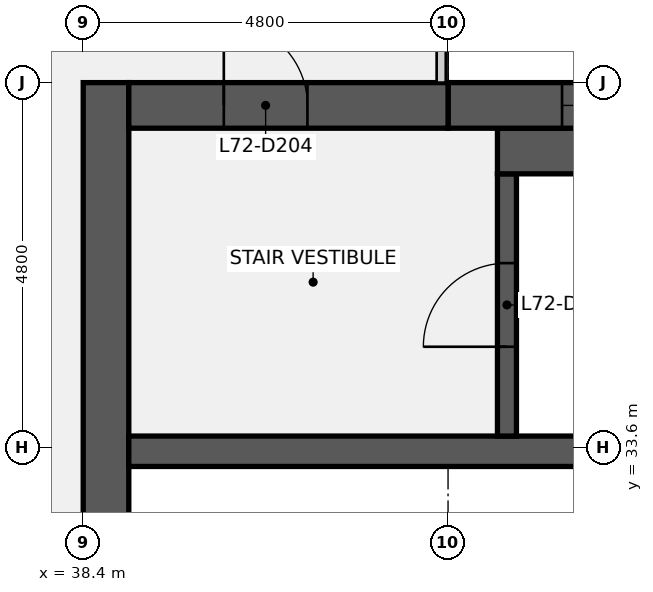
"""IFC4 building model, lengths in metres.
Left out: names, types, materials, properties, quantities, classifications, styles, units other than length and angle.
Written with IfcOpenShell. Run it as: python <this file> out.ifc"""

import sys

from ifc_helpers import new_model, si_unit, direction, frame, frame_2d, origin, place, context, subcontext, project, spatial, rectangle, extrude, element, fill, save


model = new_model("IFC4")
c1 = context("Model", 3, precision=1e-05, world=origin(), true_north=direction((0.0, 1.0)))
c2 = subcontext(c1, "Body", "Model", "MODEL_VIEW")
j1 = project(units=[si_unit("LENGTHUNIT", "METRE"), si_unit("PLANEANGLEUNIT", "RADIAN")], contexts=[c1])
p1 = place(None, origin())
s1 = spatial("IfcSite", under=j1, at=p1, CompositionType="ELEMENT")
p2 = place(p1, origin())
s2 = spatial("IfcBuilding", under=s1, at=p2, CompositionType="ELEMENT")
p3 = place(p2, frame((0.0, 0.0, 326.3)))
s3 = spatial("IfcBuildingStorey", under=s2, at=p3, CompositionType="ELEMENT", Elevation=326.3)
p4 = place(p3, frame((38.7, 9.6, 0.0), z_axis=(0.0, 0.0, 1.0), x_axis=(0.0, 1.0, 0.0)))
e1 = element("IfcWall", 1, at=p4, inside=s3, PredefinedType="SHEAR", context=c2, shape_type="SweptSolid", body=[
    extrude(rectangle(XDim=28.8, YDim=0.6, at=frame_2d((14.4, 0.0))), origin(), (0.0, 0.0, 1.0), 3.84),
])
p5 = place(p4, frame((8.7, 0.0, 0.0)))
e2 = element("IfcOpeningElement", 2, at=p5, cuts=e1, PredefinedType="OPENING", context=c2, shape_type="SweptSolid", body=[
    extrude(rectangle(XDim=1.8, YDim=2.1, at=frame_2d((0.9, 1.05))), frame((0.0, 0.31, 0.0), z_axis=(0.0, -1.0, 0.0), x_axis=(1.0, 0.0, 0.0)), (0.0, 0.0, 1.0), 0.62),
])
p6 = place(p4, frame((18.3, 0.0, 0.0)))
e3 = element("IfcOpeningElement", 3, at=p6, cuts=e1, PredefinedType="OPENING", context=c2, shape_type="SweptSolid", body=[
    extrude(rectangle(XDim=1.8, YDim=2.1, at=frame_2d((0.9, 1.05))), frame((0.0, 0.31, 0.0), z_axis=(0.0, -1.0, 0.0), x_axis=(1.0, 0.0, 0.0)), (0.0, 0.0, 1.0), 0.62),
])
p7 = place(p3, frame((39.0, 33.55, 0.0), z_axis=(0.0, 0.0, 1.0), x_axis=(1.0, 0.0, 0.0)))
e4 = element("IfcWall", 4, at=p7, inside=s3, PredefinedType="SHEAR", context=c2, shape_type="SweptSolid", body=[
    extrude(rectangle(XDim=18.0, YDim=0.4, at=frame_2d((9.0, 0.0))), origin(), (0.0, 0.0, 1.0), 3.84),
])
p8 = place(p3, frame((43.975, 33.75, 0.0), z_axis=(0.0, 0.0, 1.0), x_axis=(0.0, 1.0, 0.0)))
e5 = element("IfcWall", 5, at=p8, inside=s3, PredefinedType="SHEAR", context=c2, shape_type="SweptSolid", body=[
    extrude(rectangle(XDim=3.45, YDim=0.25, at=frame_2d((1.725, 0.0))), origin(), (0.0, 0.0, 1.0), 3.84),
])
p9 = place(p8, frame((1.175, 0.0, 0.0)))
e6 = element("IfcOpeningElement", 6, at=p9, cuts=e5, PredefinedType="OPENING", context=c2, shape_type="SweptSolid", body=[
    extrude(rectangle(XDim=1.1, YDim=2.1, at=frame_2d((0.55, 1.05))), frame((0.0, 0.135, 0.0), z_axis=(0.0, -1.0, 0.0), x_axis=(1.0, 0.0, 0.0)), (0.0, 0.0, 1.0), 0.27),
])
p10 = place(p3, frame((43.85, 37.5, 0.0), z_axis=(0.0, 0.0, 1.0), x_axis=(1.0, 0.0, 0.0)))
e7 = element("IfcWall", 7, at=p10, inside=s3, PredefinedType="SHEAR", context=c2, shape_type="SweptSolid", body=[
    extrude(rectangle(XDim=7.5, YDim=0.6, at=frame_2d((3.75, 0.0))), origin(), (0.0, 0.0, 1.0), 3.84),
])
p11 = place(p3, frame((43.2, 38.1, 0.0), z_axis=(0.0, 0.0, 1.0), x_axis=(1.0, 0.0, 0.0)))
e8 = element("IfcWall", 8, at=p11, inside=s3, PredefinedType="SHEAR", context=c2, shape_type="SweptSolid", body=[
    extrude(rectangle(XDim=13.8, YDim=0.6, at=frame_2d((6.9, 0.0))), origin(), (0.0, 0.0, 1.0), 3.84),
])
p12 = place(p11, frame((6.3, 0.0, 0.9)))
e9 = element("IfcOpeningElement", 9, at=p12, cuts=e8, PredefinedType="OPENING", context=c2, shape_type="SweptSolid", body=[
    extrude(rectangle(XDim=1.8, YDim=1.5, at=frame_2d((0.9, 0.75))), frame((0.0, 0.31, 0.0), z_axis=(0.0, -1.0, 0.0), x_axis=(1.0, 0.0, 0.0)), (0.0, 0.0, 1.0), 0.62),
])
p13 = place(p11, frame((1.5, 0.0, 0.9)))
e10 = element("IfcOpeningElement", 10, at=p13, cuts=e8, PredefinedType="OPENING", context=c2, shape_type="SweptSolid", body=[
    extrude(rectangle(XDim=1.8, YDim=1.5, at=frame_2d((0.9, 0.75))), frame((0.0, 0.31, 0.0), z_axis=(0.0, -1.0, 0.0), x_axis=(1.0, 0.0, 0.0)), (0.0, 0.0, 1.0), 0.62),
])
p14 = place(p3, frame((39.0, 38.1, 0.0), z_axis=(0.0, 0.0, 1.0), x_axis=(1.0, 0.0, 0.0)))
e11 = element("IfcWall", 11, at=p14, inside=s3, PredefinedType="SHEAR", context=c2, shape_type="SweptSolid", body=[
    extrude(rectangle(XDim=4.2, YDim=0.6, at=frame_2d((2.1, 0.0))), origin(), (0.0, 0.0, 1.0), 3.84),
])
p15 = place(p14, frame((1.25, 0.0, 0.0)))
e12 = element("IfcOpeningElement", 12, at=p15, cuts=e11, PredefinedType="OPENING", context=c2, shape_type="SweptSolid", body=[
    extrude(rectangle(XDim=1.1, YDim=2.1, at=frame_2d((0.55, 1.05))), frame((0.0, 0.31, 0.0), z_axis=(0.0, -1.0, 0.0), x_axis=(1.0, 0.0, 0.0)), (0.0, 0.0, 1.0), 0.62),
])
p16 = place(p9, origin())
e13 = element("IfcDoor", 13, at=p16, inside=s3, OperationType="SINGLE_SWING_LEFT", PredefinedType="DOOR", context=c2, shape_type="SweptSolid", body=[
    extrude(rectangle(XDim=1.1, YDim=2.1, at=frame_2d((0.55, 1.05))), frame((0.0, 0.025, 0.0), z_axis=(0.0, -1.0, 0.0), x_axis=(1.0, 0.0, 0.0)), (0.0, 0.0, 1.0), 0.05),
])
fill(e6, e13)
p17 = place(p15, origin())
e14 = element("IfcDoor", 14, at=p17, inside=s3, OperationType="SINGLE_SWING_LEFT", PredefinedType="DOOR", context=c2, shape_type="SweptSolid", body=[
    extrude(rectangle(XDim=1.1, YDim=2.1, at=frame_2d((0.55, 1.05))), frame((0.0, 0.025, 0.0), z_axis=(0.0, -1.0, 0.0), x_axis=(1.0, 0.0, 0.0)), (0.0, 0.0, 1.0), 0.05),
])
fill(e12, e14)
p18 = place(p13, origin())
e15 = element("IfcWindow", 15, at=p18, inside=s3, PartitioningType="SINGLE_PANEL", PredefinedType="WINDOW", context=c2, shape_type="SweptSolid", body=[
    extrude(rectangle(XDim=1.8, YDim=1.5, at=frame_2d((0.9, 0.75))), frame((0.0, 0.03, 0.0), z_axis=(0.0, -1.0, 0.0), x_axis=(1.0, 0.0, 0.0)), (0.0, 0.0, 1.0), 0.06),
])
fill(e10, e15)
save(model, sys.argv[1])
